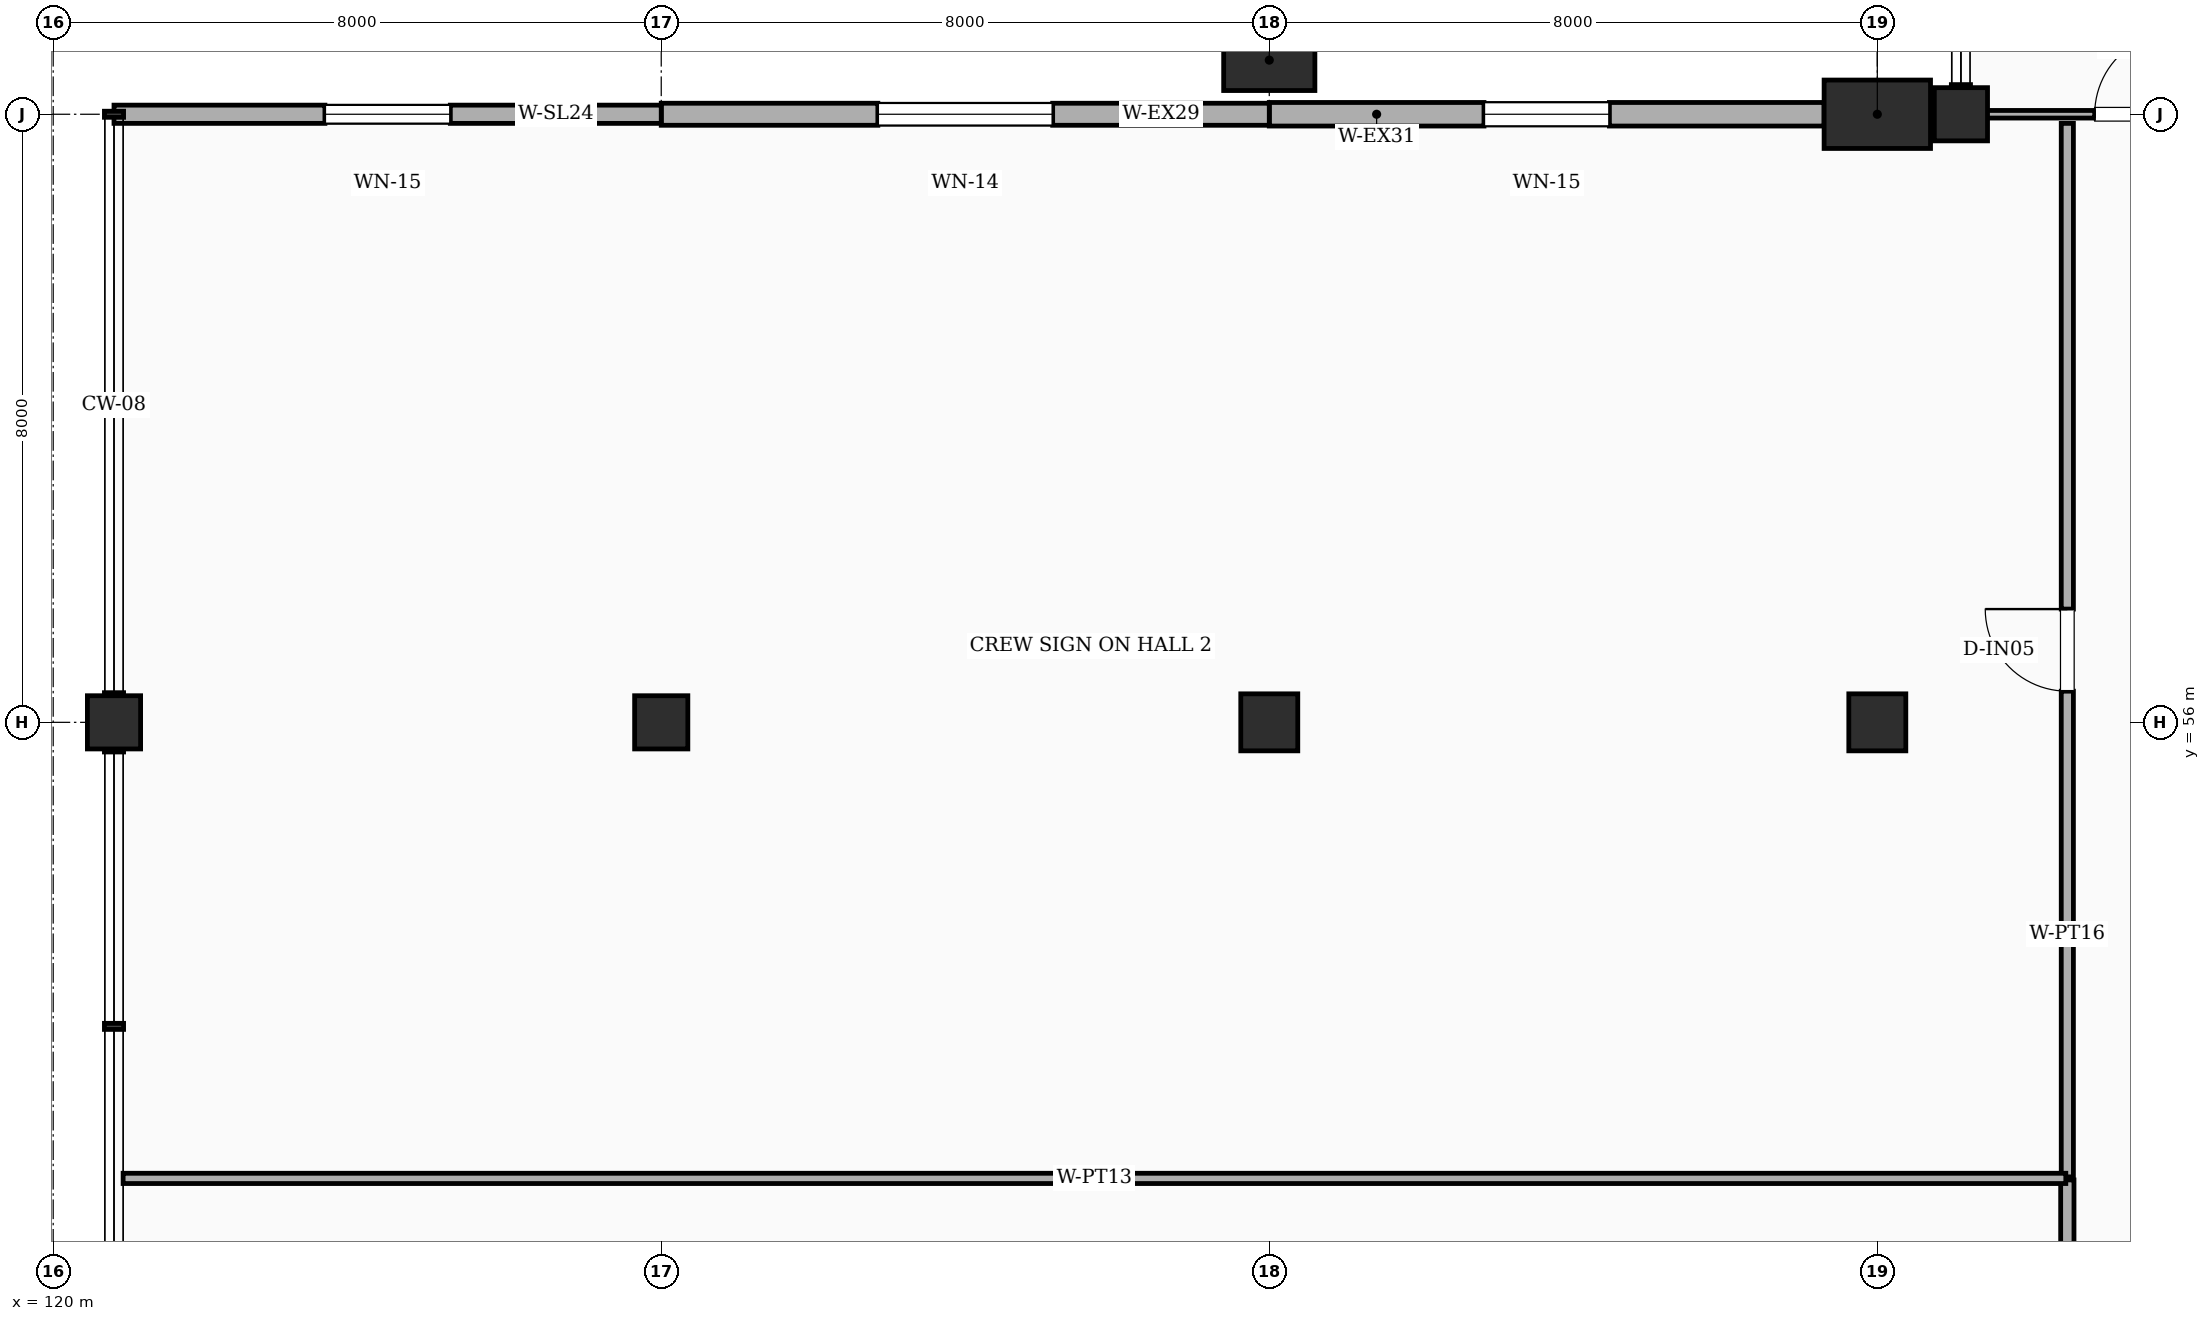
"""IFC4 building model, lengths in metres.
Left out: names, types, materials, properties, quantities, classifications, styles, units other than length and angle.
Written with IfcOpenShell. Run it as: python <this file> out.ifc"""

import sys

from ifc_helpers import new_model, si_unit, direction, frame, frame_2d, origin, origin_2d, place, context, subcontext, project, spatial, rectangle, extrude, element, fill, save


model = new_model("IFC4")
c1 = context("Model", 3, precision=1e-05, world=origin(), true_north=direction((0.0, 1.0)))
c2 = subcontext(c1, "Body", "Model", "MODEL_VIEW")
j1 = project(units=[si_unit("LENGTHUNIT", "METRE"), si_unit("PLANEANGLEUNIT", "RADIAN")], contexts=[c1])
p1 = place(None, origin())
s1 = spatial("IfcSite", under=j1, at=p1, CompositionType="ELEMENT")
p2 = place(p1, origin())
s2 = spatial("IfcBuilding", under=s1, at=p2, CompositionType="ELEMENT")
p3 = place(p2, frame((0.0, 0.0, 5.4)))
s3 = spatial("IfcBuildingStorey", under=s2, at=p3, CompositionType="ELEMENT", Elevation=5.4)
p4 = place(p3, frame((136.0, 64.712, 0.0), z_axis=(0.0, 0.0, 1.0), x_axis=(1.0, 0.0, 0.0)))
e1 = element("IfcColumn", 1, at=p4, inside=s3, PredefinedType="COLUMN", context=c2, shape_type="SweptSolid", body=[
    extrude(rectangle(XDim=1.2, YDim=0.8, at=origin_2d()), origin(), (0.0, 0.0, 1.0), 5.4),
])
p5 = place(p3, frame((144.0, 64.0, 0.0), z_axis=(0.0, 0.0, 1.0), x_axis=(1.0, 0.0, 0.0)))
e2 = element("IfcColumn", 2, at=p5, inside=s3, PredefinedType="COLUMN", context=c2, shape_type="SweptSolid", body=[
    extrude(rectangle(XDim=1.4, YDim=0.9, at=origin_2d()), origin(), (0.0, 0.0, 1.0), 5.4),
])
for number, where, z_axis, x_axis in (
    (3, (120.8, 56.0, 0.0), (0.0, 0.0, 1.0), (1.0, 0.0, 0.0)),
    (4, (128.0, 56.0, 0.0), (0.0, 0.0, 1.0), (1.0, 0.0, 0.0)),
):
    element("IfcColumn", number, at=place(p3, frame(where, z_axis=z_axis, x_axis=x_axis)), inside=s3, PredefinedType="COLUMN", context=c2, shape_type="SweptSolid", body=[
        extrude(rectangle(XDim=0.7, YDim=0.7, at=origin_2d()), origin(), (0.0, 0.0, 1.0), 5.4),
    ])
for number, where, z_axis, x_axis in (
    (5, (136.0, 56.0, 0.0), (0.0, 0.0, 1.0), (1.0, 0.0, 0.0)),
    (6, (144.0, 56.0, 0.0), (0.0, 0.0, 1.0), (1.0, 0.0, 0.0)),
):
    element("IfcColumn", number, at=place(p3, frame(where, z_axis=z_axis, x_axis=x_axis)), inside=s3, PredefinedType="COLUMN", context=c2, shape_type="SweptSolid", body=[
        extrude(rectangle(XDim=0.75, YDim=0.75, at=origin_2d()), origin(), (0.0, 0.0, 1.0), 5.4),
    ])
p6 = place(p3, frame((145.1, 64.0, 0.0), z_axis=(0.0, 0.0, 1.0), x_axis=(1.0, 0.0, 0.0)))
e7 = element("IfcColumn", 7, at=p6, inside=s3, PredefinedType="COLUMN", context=c2, shape_type="SweptSolid", body=[
    extrude(rectangle(XDim=0.7, YDim=0.7, at=origin_2d()), origin(), (0.0, 0.0, 1.0), 5.4),
])
p7 = place(p3, frame((143.3, 64.0, 0.0), z_axis=(0.0, 0.0, 1.0), x_axis=(-1.0, 0.0, 0.0)))
e8 = element("IfcWall", 8, at=p7, inside=s3, PredefinedType="STANDARD", context=c2, shape_type="SweptSolid", body=[
    extrude(rectangle(XDim=7.3, YDim=0.31, at=frame_2d((3.65, 0.0))), origin(), (0.0, 0.0, 1.0), 3.98),
])
p8 = place(p7, frame((2.825, 0.0, 0.95)))
e9 = element("IfcOpeningElement", 9, at=p8, cuts=e8, PredefinedType="OPENING", context=c2, shape_type="SweptSolid", body=[
    extrude(rectangle(XDim=1.65, YDim=1.8, at=frame_2d((0.825, 0.9))), frame((0.0, 0.165, 0.0), z_axis=(0.0, -1.0, 0.0), x_axis=(1.0, 0.0, 0.0)), (0.0, 0.0, 1.0), 0.33),
])
p9 = place(p3, frame((136.0, 64.0, 0.0), z_axis=(0.0, 0.0, 1.0), x_axis=(-1.0, 0.0, 0.0)))
e10 = element("IfcWall", 10, at=p9, inside=s3, PredefinedType="STANDARD", context=c2, shape_type="SweptSolid", body=[
    extrude(rectangle(XDim=8.0, YDim=0.29, at=frame_2d((4.0, 0.0))), origin(), (0.0, 0.0, 1.0), 5.12),
])
p10 = place(p9, frame((2.85, 0.0, 0.95)))
e11 = element("IfcOpeningElement", 11, at=p10, cuts=e10, PredefinedType="OPENING", context=c2, shape_type="SweptSolid", body=[
    extrude(rectangle(XDim=2.3, YDim=1.8, at=frame_2d((1.15, 0.9))), frame((0.0, 0.155, 0.0), z_axis=(0.0, -1.0, 0.0), x_axis=(1.0, 0.0, 0.0)), (0.0, 0.0, 1.0), 0.31),
])
p11 = place(p3, frame((128.0, 64.0, 0.0), z_axis=(0.0, 0.0, 1.0), x_axis=(-1.0, 0.0, 0.0)))
e12 = element("IfcWall", 12, at=p11, inside=s3, PredefinedType="SOLIDWALL", context=c2, shape_type="SweptSolid", body=[
    extrude(rectangle(XDim=7.2, YDim=0.24, at=frame_2d((3.6, 0.0))), origin(), (0.0, 0.0, 1.0), 5.12),
])
p12 = place(p11, frame((2.775, 0.0, 0.95)))
e13 = element("IfcOpeningElement", 13, at=p12, cuts=e12, PredefinedType="OPENING", context=c2, shape_type="SweptSolid", body=[
    extrude(rectangle(XDim=1.65, YDim=1.8, at=frame_2d((0.825, 0.9))), frame((0.0, 0.13, 0.0), z_axis=(0.0, -1.0, 0.0), x_axis=(1.0, 0.0, 0.0)), (0.0, 0.0, 1.0), 0.26),
])
p13 = place(p3, frame((146.5, 32.02, 0.0), z_axis=(0.0, 0.0, 1.0), x_axis=(0.0, 1.0, 0.0)))
e14 = element("IfcWall", 14, at=p13, inside=s3, PredefinedType="PARTITIONING", context=c2, shape_type="SweptSolid", body=[
    extrude(rectangle(XDim=17.96, YDim=0.175, at=frame_2d((8.98, 0.0))), origin(), (0.0, 0.0, 1.0), 5.12),
])
p14 = place(p13, frame((8.44, 0.0, 0.0)))
e15 = element("IfcOpeningElement", 15, at=p14, cuts=e14, PredefinedType="OPENING", context=c2, shape_type="SweptSolid", body=[
    extrude(rectangle(XDim=1.08, YDim=2.15, at=frame_2d((0.54, 1.075))), frame((0.0, 0.097, 0.0), z_axis=(0.0, -1.0, 0.0), x_axis=(1.0, 0.0, 0.0)), (0.0, 0.0, 1.0), 0.195),
])
p15 = place(p3, frame((146.5, 50.02, 0.0), z_axis=(0.0, 0.0, 1.0), x_axis=(0.0, 1.0, 0.0)))
e16 = element("IfcWall", 16, at=p15, inside=s3, PredefinedType="PARTITIONING", context=c2, shape_type="SweptSolid", body=[
    extrude(rectangle(XDim=13.86, YDim=0.16, at=frame_2d((6.93, 0.0))), origin(), (0.0, 0.0, 1.0), 4.44),
])
p16 = place(p15, frame((6.39, 0.0, 0.0)))
e17 = element("IfcOpeningElement", 17, at=p16, cuts=e16, PredefinedType="OPENING", context=c2, shape_type="SweptSolid", body=[
    extrude(rectangle(XDim=1.08, YDim=2.15, at=frame_2d((0.54, 1.075))), frame((0.0, 0.09, 0.0), z_axis=(0.0, -1.0, 0.0), x_axis=(1.0, 0.0, 0.0)), (0.0, 0.0, 1.0), 0.18),
])
p17 = place(p3, frame((120.92, 50.0, 0.0), z_axis=(0.0, 0.0, 1.0), x_axis=(1.0, 0.0, 0.0)))
e18 = element("IfcWall", 18, at=p17, inside=s3, PredefinedType="PARTITIONING", context=c2, shape_type="SweptSolid", body=[
    extrude(rectangle(XDim=25.56, YDim=0.135, at=frame_2d((12.78, 0.0))), origin(), (0.0, 0.0, 1.0), 4.39),
])
p18 = place(p3, frame((145.22, 64.0, 0.0), z_axis=(0.0, 0.0, 1.0), x_axis=(1.0, 0.0, 0.0)))
e19 = element("IfcWall", 19, at=p18, inside=s3, PredefinedType="PARTITIONING", context=c2, shape_type="SweptSolid", body=[
    extrude(rectangle(XDim=4.36, YDim=0.1, at=frame_2d((2.18, 0.0))), origin(), (0.0, 0.0, 1.0), 4.44),
])
p19 = place(p18, frame((1.64, 0.0, 0.0)))
e20 = element("IfcOpeningElement", 20, at=p19, cuts=e19, PredefinedType="OPENING", context=c2, shape_type="SweptSolid", body=[
    extrude(rectangle(XDim=1.08, YDim=2.15, at=frame_2d((0.54, 1.075))), frame((0.0, 0.06, 0.0), z_axis=(0.0, -1.0, 0.0), x_axis=(1.0, 0.0, 0.0)), (0.0, 0.0, 1.0), 0.12),
])
p20 = place(p8, origin())
e21 = element("IfcWindow", 21, at=p20, inside=s3, PartitioningType="SINGLE_PANEL", PredefinedType="WINDOW", context=c2, shape_type="SweptSolid", body=[
    extrude(rectangle(XDim=1.65, YDim=1.8, at=frame_2d((0.825, 0.9))), frame((0.0, 0.03, 0.0), z_axis=(0.0, -1.0, 0.0), x_axis=(1.0, 0.0, 0.0)), (0.0, 0.0, 1.0), 0.06),
])
fill(e9, e21)
p21 = place(p10, origin())
e22 = element("IfcWindow", 22, at=p21, inside=s3, PartitioningType="SINGLE_PANEL", PredefinedType="WINDOW", context=c2, shape_type="SweptSolid", body=[
    extrude(rectangle(XDim=2.3, YDim=1.8, at=frame_2d((1.15, 0.9))), frame((0.0, 0.03, 0.0), z_axis=(0.0, -1.0, 0.0), x_axis=(1.0, 0.0, 0.0)), (0.0, 0.0, 1.0), 0.06),
])
fill(e11, e22)
p22 = place(p12, origin())
e23 = element("IfcWindow", 23, at=p22, inside=s3, PartitioningType="SINGLE_PANEL", PredefinedType="WINDOW", context=c2, shape_type="SweptSolid", body=[
    extrude(rectangle(XDim=1.65, YDim=1.8, at=frame_2d((0.825, 0.9))), frame((0.0, 0.03, 0.0), z_axis=(0.0, -1.0, 0.0), x_axis=(1.0, 0.0, 0.0)), (0.0, 0.0, 1.0), 0.06),
])
fill(e13, e23)
p23 = place(p16, origin())
e24 = element("IfcDoor", 24, at=p23, inside=s3, OperationType="SINGLE_SWING_RIGHT", PredefinedType="DOOR", context=c2, shape_type="SweptSolid", body=[
    extrude(rectangle(XDim=1.08, YDim=2.15, at=frame_2d((0.54, 1.075))), frame((0.0, 0.025, 0.0), z_axis=(0.0, -1.0, 0.0), x_axis=(1.0, 0.0, 0.0)), (0.0, 0.0, 1.0), 0.05),
])
fill(e17, e24)
p24 = place(p19, origin())
e25 = element("IfcDoor", 25, at=p24, inside=s3, OperationType="SINGLE_SWING_RIGHT", PredefinedType="DOOR", context=c2, shape_type="SweptSolid", body=[
    extrude(rectangle(XDim=1.08, YDim=2.15, at=frame_2d((0.54, 1.075))), frame((0.0, 0.025, 0.0), z_axis=(0.0, -1.0, 0.0), x_axis=(1.0, 0.0, 0.0)), (0.0, 0.0, 1.0), 0.05),
])
fill(e20, e25)
save(model, sys.argv[1])
